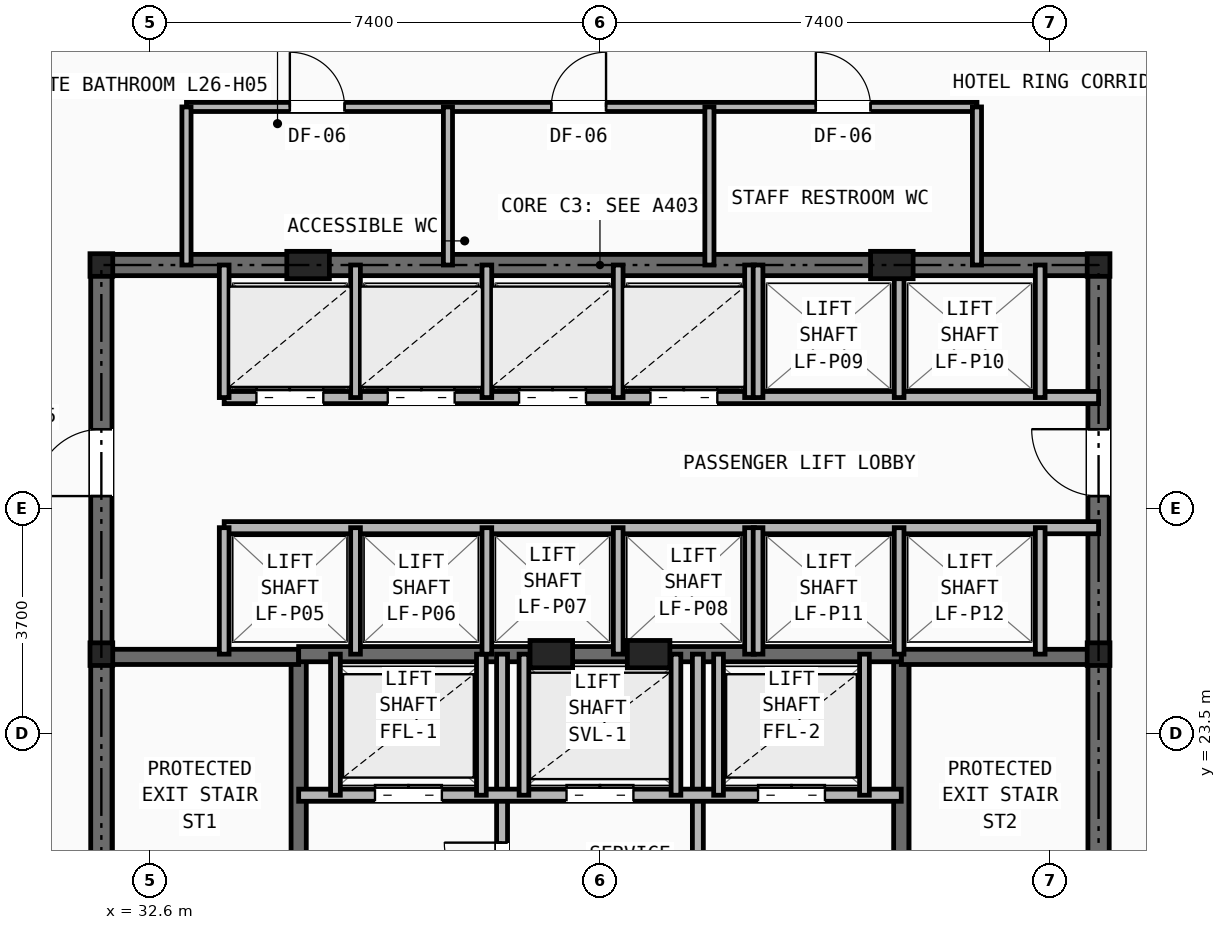
"""IFC4 building model, lengths in metres.
Left out: names, types, materials, properties, quantities, classifications, styles, units other than length and angle.
Written with IfcOpenShell. Run it as: python <this file> out.ifc"""

import sys

from ifc_helpers import new_model, si_unit, direction, frame, frame_2d, origin, origin_2d, place, context, subcontext, project, spatial, rectangle, i_section, extrude, element, fill, save


model = new_model("IFC4")
c1 = context("Model", 3, precision=1e-05, world=origin(), true_north=direction((0.0, 1.0)))
c2 = subcontext(c1, "Body", "Model", "MODEL_VIEW")
j1 = project(units=[si_unit("LENGTHUNIT", "METRE"), si_unit("PLANEANGLEUNIT", "RADIAN")], contexts=[c1])
p1 = place(None, origin())
s1 = spatial("IfcSite", under=j1, at=p1, CompositionType="ELEMENT")
p2 = place(p1, origin())
s2 = spatial("IfcBuilding", under=s1, at=p2, CompositionType="ELEMENT")
p3 = place(p2, frame((0.0, 0.0, 92.6)))
s3 = spatial("IfcBuildingStorey", under=s2, at=p3, CompositionType="ELEMENT", Elevation=92.6)
for number, where, z_axis, x_axis in (
    (1, (31.8, 24.8, 0.0), (0.0, 0.0, 1.0), (1.0, 0.0, 0.0)),
    (2, (48.2, 24.8, 0.0), (0.0, 0.0, 1.0), (1.0, 0.0, 0.0)),
    (3, (31.8, 31.2, 0.0), (0.0, 0.0, 1.0), (1.0, 0.0, 0.0)),
    (4, (48.2, 31.2, 0.0), (0.0, 0.0, 1.0), (1.0, 0.0, 0.0)),
):
    element("IfcColumn", number, at=place(p3, frame(where, z_axis=z_axis, x_axis=x_axis)), inside=s3, PredefinedType="COLUMN", context=c2, shape_type="SweptSolid", body=[
        extrude(i_section(OverallWidth=0.374, OverallDepth=0.372, WebThickness=0.016, FlangeThickness=0.026, at=origin_2d()), origin(), (0.0, 0.0, 1.0), 3.2),
    ])
for number, where, z_axis, x_axis in (
    (5, (35.2, 31.2, 0.0), (0.0, 0.0, 1.0), (1.0, 0.0, 0.0)),
    (6, (44.8, 31.2, 0.0), (0.0, 0.0, 1.0), (1.0, 0.0, 0.0)),
    (7, (39.2, 24.8, 0.0), (0.0, 0.0, 1.0), (1.0, 0.0, 0.0)),
    (8, (40.8, 24.8, 0.0), (0.0, 0.0, 1.0), (1.0, 0.0, 0.0)),
):
    element("IfcColumn", number, at=place(p3, frame(where, z_axis=z_axis, x_axis=x_axis)), inside=s3, PredefinedType="PILASTER", context=c2, shape_type="SweptSolid", body=[
        extrude(rectangle(XDim=0.7, YDim=0.45, at=origin_2d()), origin(), (0.0, 0.0, 1.0), 3.2),
    ])
p4 = place(p3, frame((31.8, 31.2, 0.0), z_axis=(0.0, 0.0, 1.0), x_axis=(1.0, 0.0, 0.0)))
e9 = element("IfcWall", 9, at=p4, inside=s3, PredefinedType="SHEAR", context=c2, shape_type="SweptSolid", body=[
    extrude(rectangle(XDim=16.4, YDim=0.35, at=frame_2d((8.2, 0.0))), origin(), (0.0, 0.0, 1.0), 2.97),
])
p5 = place(p3, frame((31.8, 16.4, 0.0), z_axis=(0.0, 0.0, 1.0), x_axis=(0.0, 1.0, 0.0)))
e10 = element("IfcWall", 10, at=p5, inside=s3, PredefinedType="SHEAR", context=c2, shape_type="SweptSolid", body=[
    extrude(rectangle(XDim=14.8, YDim=0.35, at=frame_2d((7.4, 0.0))), origin(), (0.0, 0.0, 1.0), 2.97),
])
p6 = place(p5, frame((11.0, 0.0, 0.0)))
e11 = element("IfcOpeningElement", 11, at=p6, cuts=e10, PredefinedType="OPENING", context=c2, shape_type="SweptSolid", body=[
    extrude(rectangle(XDim=1.1, YDim=2.15, at=frame_2d((0.55, 1.075))), frame((0.0, 0.185, 0.0), z_axis=(0.0, -1.0, 0.0), x_axis=(1.0, 0.0, 0.0)), (0.0, 0.0, 1.0), 0.37),
])
p7 = place(p3, frame((48.2, 16.4, 0.0), z_axis=(0.0, 0.0, 1.0), x_axis=(0.0, 1.0, 0.0)))
e12 = element("IfcWall", 12, at=p7, inside=s3, PredefinedType="SHEAR", context=c2, shape_type="SweptSolid", body=[
    extrude(rectangle(XDim=14.8, YDim=0.35, at=frame_2d((7.4, 0.0))), origin(), (0.0, 0.0, 1.0), 2.97),
])
p8 = place(p7, frame((11.0, 0.0, 0.0)))
e13 = element("IfcOpeningElement", 13, at=p8, cuts=e12, PredefinedType="OPENING", context=c2, shape_type="SweptSolid", body=[
    extrude(rectangle(XDim=1.1, YDim=2.15, at=frame_2d((0.55, 1.075))), frame((0.0, 0.185, 0.0), z_axis=(0.0, -1.0, 0.0), x_axis=(1.0, 0.0, 0.0)), (0.0, 0.0, 1.0), 0.37),
])
p9 = place(p3, frame((35.045, 16.4, 0.0), z_axis=(0.0, 0.0, 1.0), x_axis=(0.0, 1.0, 0.0)))
e14 = element("IfcWall", 14, at=p9, inside=s3, PredefinedType="SHEAR", context=c2, shape_type="SweptSolid", body=[
    extrude(rectangle(XDim=8.4, YDim=0.25, at=frame_2d((4.2, 0.0))), origin(), (0.0, 0.0, 1.0), 2.97),
])
p10 = place(p9, frame((0.45, 0.0, 0.0)))
e15 = element("IfcOpeningElement", 15, at=p10, cuts=e14, PredefinedType="OPENING", context=c2, shape_type="SweptSolid", body=[
    extrude(rectangle(XDim=0.95, YDim=2.1, at=frame_2d((0.475, 1.05))), frame((0.0, 0.135, 0.0), z_axis=(0.0, -1.0, 0.0), x_axis=(1.0, 0.0, 0.0)), (0.0, 0.0, 1.0), 0.27),
])
p11 = place(p3, frame((31.8, 24.755, 0.0), z_axis=(0.0, 0.0, 1.0), x_axis=(1.0, 0.0, 0.0)))
e16 = element("IfcWall", 16, at=p11, inside=s3, PredefinedType="SHEAR", context=c2, shape_type="SweptSolid", body=[
    extrude(rectangle(XDim=3.245, YDim=0.25, at=frame_2d((1.623, 0.0))), origin(), (0.0, 0.0, 1.0), 2.97),
])
p12 = place(p3, frame((44.955, 16.4, 0.0), z_axis=(0.0, 0.0, 1.0), x_axis=(0.0, 1.0, 0.0)))
e17 = element("IfcWall", 17, at=p12, inside=s3, PredefinedType="SHEAR", context=c2, shape_type="SweptSolid", body=[
    extrude(rectangle(XDim=8.4, YDim=0.25, at=frame_2d((4.2, 0.0))), origin(), (0.0, 0.0, 1.0), 2.97),
])
p13 = place(p12, frame((0.45, 0.0, 0.0)))
e18 = element("IfcOpeningElement", 18, at=p13, cuts=e17, PredefinedType="OPENING", context=c2, shape_type="SweptSolid", body=[
    extrude(rectangle(XDim=0.95, YDim=2.1, at=frame_2d((0.475, 1.05))), frame((0.0, 0.135, 0.0), z_axis=(0.0, -1.0, 0.0), x_axis=(1.0, 0.0, 0.0)), (0.0, 0.0, 1.0), 0.27),
])
p14 = place(p3, frame((44.955, 24.755, 0.0), z_axis=(0.0, 0.0, 1.0), x_axis=(1.0, 0.0, 0.0)))
e19 = element("IfcWall", 19, at=p14, inside=s3, PredefinedType="SHEAR", context=c2, shape_type="SweptSolid", body=[
    extrude(rectangle(XDim=3.245, YDim=0.25, at=frame_2d((1.623, 0.0))), origin(), (0.0, 0.0, 1.0), 2.97),
])
p15 = place(p3, frame((35.045, 24.8, 0.0), z_axis=(0.0, 0.0, 1.0), x_axis=(1.0, 0.0, 0.0)))
e20 = element("IfcWall", 20, at=p15, inside=s3, PredefinedType="SHEAR", context=c2, shape_type="SweptSolid", body=[
    extrude(rectangle(XDim=9.91, YDim=0.25, at=frame_2d((4.955, 0.0))), origin(), (0.0, 0.0, 1.0), 2.97),
])
p16 = place(p3, frame((38.39, 16.4, 0.0), z_axis=(0.0, 0.0, 1.0), x_axis=(0.0, 1.0, 0.0)))
e21 = element("IfcWall", 21, at=p16, inside=s3, PredefinedType="PARTITIONING", context=c2, shape_type="SweptSolid", body=[
    extrude(rectangle(XDim=8.4, YDim=0.18, at=frame_2d((4.2, 0.0))), origin(), (0.0, 0.0, 1.0), 2.421),
])
p17 = place(p16, frame((1.8, 0.0, 0.0)))
e22 = element("IfcOpeningElement", 22, at=p17, cuts=e21, PredefinedType="OPENING", context=c2, shape_type="SweptSolid", body=[
    extrude(rectangle(XDim=0.85, YDim=2.05, at=frame_2d((0.425, 1.025))), frame((0.0, 0.1, 0.0), z_axis=(0.0, -1.0, 0.0), x_axis=(1.0, 0.0, 0.0)), (0.0, 0.0, 1.0), 0.2),
])
p18 = place(p16, frame((4.35, 0.0, 0.0)))
e23 = element("IfcOpeningElement", 23, at=p18, cuts=e21, PredefinedType="OPENING", context=c2, shape_type="SweptSolid", body=[
    extrude(rectangle(XDim=0.95, YDim=2.1, at=frame_2d((0.475, 1.05))), frame((0.0, 0.1, 0.0), z_axis=(0.0, -1.0, 0.0), x_axis=(1.0, 0.0, 0.0)), (0.0, 0.0, 1.0), 0.2),
])
p19 = place(p3, frame((41.61, 16.4, 0.0), z_axis=(0.0, 0.0, 1.0), x_axis=(0.0, 1.0, 0.0)))
e24 = element("IfcWall", 24, at=p19, inside=s3, PredefinedType="PARTITIONING", context=c2, shape_type="SweptSolid", body=[
    extrude(rectangle(XDim=8.4, YDim=0.18, at=frame_2d((4.2, 0.0))), origin(), (0.0, 0.0, 1.0), 2.421),
])
p20 = place(p19, frame((1.8, 0.0, 0.0)))
e25 = element("IfcOpeningElement", 25, at=p20, cuts=e24, PredefinedType="OPENING", context=c2, shape_type="SweptSolid", body=[
    extrude(rectangle(XDim=0.85, YDim=2.05, at=frame_2d((0.425, 1.025))), frame((0.0, 0.1, 0.0), z_axis=(0.0, -1.0, 0.0), x_axis=(1.0, 0.0, 0.0)), (0.0, 0.0, 1.0), 0.2),
])
p21 = place(p3, frame((35.045, 22.48, 0.0), z_axis=(0.0, 0.0, 1.0), x_axis=(1.0, 0.0, 0.0)))
e26 = element("IfcWall", 26, at=p21, inside=s3, PredefinedType="SOLIDWALL", context=c2, shape_type="SweptSolid", body=[
    extrude(rectangle(XDim=9.91, YDim=0.2, at=frame_2d((4.955, 0.0))), origin(), (0.0, 0.0, 1.0), 2.97),
])
p22 = place(p21, frame((1.255, 0.0, 0.0)))
e27 = element("IfcOpeningElement", 27, at=p22, cuts=e26, PredefinedType="OPENING", context=c2, shape_type="SweptSolid", body=[
    extrude(rectangle(XDim=1.1, YDim=2.15, at=frame_2d((0.55, 1.075))), frame((0.0, 0.11, 0.0), z_axis=(0.0, -1.0, 0.0), x_axis=(1.0, 0.0, 0.0)), (0.0, 0.0, 1.0), 0.22),
])
p23 = place(p21, frame((7.555, 0.0, 0.0)))
e28 = element("IfcOpeningElement", 28, at=p23, cuts=e26, PredefinedType="OPENING", context=c2, shape_type="SweptSolid", body=[
    extrude(rectangle(XDim=1.1, YDim=2.15, at=frame_2d((0.55, 1.075))), frame((0.0, 0.11, 0.0), z_axis=(0.0, -1.0, 0.0), x_axis=(1.0, 0.0, 0.0)), (0.0, 0.0, 1.0), 0.22),
])
p24 = place(p21, frame((4.405, 0.0, 0.0)))
e29 = element("IfcOpeningElement", 29, at=p24, cuts=e26, PredefinedType="OPENING", context=c2, shape_type="SweptSolid", body=[
    extrude(rectangle(XDim=1.1, YDim=2.15, at=frame_2d((0.55, 1.075))), frame((0.0, 0.11, 0.0), z_axis=(0.0, -1.0, 0.0), x_axis=(1.0, 0.0, 0.0)), (0.0, 0.0, 1.0), 0.22),
])
for number, where, z_axis, x_axis in (
    (30, (35.65, 22.48, 0.0), (0.0, 0.0, 1.0), (0.0, 1.0, 0.0)),
    (31, (38.05, 22.48, 0.0), (0.0, 0.0, 1.0), (0.0, 1.0, 0.0)),
    (32, (41.95, 22.48, 0.0), (0.0, 0.0, 1.0), (0.0, 1.0, 0.0)),
    (33, (44.35, 22.48, 0.0), (0.0, 0.0, 1.0), (0.0, 1.0, 0.0)),
    (34, (38.75, 22.48, 0.0), (0.0, 0.0, 1.0), (0.0, 1.0, 0.0)),
    (35, (41.25, 22.48, 0.0), (0.0, 0.0, 1.0), (0.0, 1.0, 0.0)),
):
    element("IfcWall", number, at=place(p3, frame(where, z_axis=z_axis, x_axis=x_axis)), inside=s3, PredefinedType="SOLIDWALL", context=c2, shape_type="SweptSolid", body=[
        extrude(rectangle(XDim=2.32, YDim=0.16, at=frame_2d((1.16, 0.0))), origin(), (0.0, 0.0, 1.0), 2.97),
    ])
p25 = place(p3, frame((33.82, 29.02, 0.0), z_axis=(0.0, 0.0, 1.0), x_axis=(1.0, 0.0, 0.0)))
e36 = element("IfcWall", 36, at=p25, inside=s3, PredefinedType="SOLIDWALL", context=c2, shape_type="SweptSolid", body=[
    extrude(rectangle(XDim=14.38, YDim=0.2, at=frame_2d((7.19, 0.0))), origin(), (0.0, 0.0, 1.0), 2.421),
])
p26 = place(p25, frame((0.53, 0.0, 0.0)))
e37 = element("IfcOpeningElement", 37, at=p26, cuts=e36, PredefinedType="OPENING", context=c2, shape_type="SweptSolid", body=[
    extrude(rectangle(XDim=1.1, YDim=2.15, at=frame_2d((0.55, 1.075))), frame((0.0, 0.11, 0.0), z_axis=(0.0, -1.0, 0.0), x_axis=(1.0, 0.0, 0.0)), (0.0, 0.0, 1.0), 0.22),
])
p27 = place(p25, frame((2.69, 0.0, 0.0)))
e38 = element("IfcOpeningElement", 38, at=p27, cuts=e36, PredefinedType="OPENING", context=c2, shape_type="SweptSolid", body=[
    extrude(rectangle(XDim=1.1, YDim=2.15, at=frame_2d((0.55, 1.075))), frame((0.0, 0.11, 0.0), z_axis=(0.0, -1.0, 0.0), x_axis=(1.0, 0.0, 0.0)), (0.0, 0.0, 1.0), 0.22),
])
p28 = place(p25, frame((4.85, 0.0, 0.0)))
e39 = element("IfcOpeningElement", 39, at=p28, cuts=e36, PredefinedType="OPENING", context=c2, shape_type="SweptSolid", body=[
    extrude(rectangle(XDim=1.1, YDim=2.15, at=frame_2d((0.55, 1.075))), frame((0.0, 0.11, 0.0), z_axis=(0.0, -1.0, 0.0), x_axis=(1.0, 0.0, 0.0)), (0.0, 0.0, 1.0), 0.22),
])
p29 = place(p25, frame((7.01, 0.0, 0.0)))
e40 = element("IfcOpeningElement", 40, at=p29, cuts=e36, PredefinedType="OPENING", context=c2, shape_type="SweptSolid", body=[
    extrude(rectangle(XDim=1.1, YDim=2.15, at=frame_2d((0.55, 1.075))), frame((0.0, 0.11, 0.0), z_axis=(0.0, -1.0, 0.0), x_axis=(1.0, 0.0, 0.0)), (0.0, 0.0, 1.0), 0.22),
])
p30 = place(p3, frame((33.82, 26.88, 0.0), z_axis=(0.0, 0.0, 1.0), x_axis=(1.0, 0.0, 0.0)))
e41 = element("IfcWall", 41, at=p30, inside=s3, PredefinedType="SOLIDWALL", context=c2, shape_type="SweptSolid", body=[
    extrude(rectangle(XDim=14.38, YDim=0.2, at=frame_2d((7.19, 0.0))), origin(), (0.0, 0.0, 1.0), 2.421),
])
p31 = place(p3, frame((33.82, 29.02, 0.0), z_axis=(0.0, 0.0, 1.0), x_axis=(0.0, 1.0, 0.0)))
e42 = element("IfcWall", 42, at=p31, inside=s3, PredefinedType="SOLIDWALL", context=c2, shape_type="SweptSolid", body=[
    extrude(rectangle(XDim=2.18, YDim=0.16, at=frame_2d((1.09, 0.0))), origin(), (0.0, 0.0, 1.0), 2.421),
])
p32 = place(p3, frame((33.82, 24.8, 0.0), z_axis=(0.0, 0.0, 1.0), x_axis=(0.0, 1.0, 0.0)))
e43 = element("IfcWall", 43, at=p32, inside=s3, PredefinedType="SOLIDWALL", context=c2, shape_type="SweptSolid", body=[
    extrude(rectangle(XDim=2.08, YDim=0.16, at=frame_2d((1.04, 0.0))), origin(), (0.0, 0.0, 1.0), 2.97),
])
for number, where, z_axis, x_axis in (
    (44, (35.98, 29.02, 0.0), (0.0, 0.0, 1.0), (0.0, 1.0, 0.0)),
    (45, (38.14, 29.02, 0.0), (0.0, 0.0, 1.0), (0.0, 1.0, 0.0)),
    (46, (40.3, 29.02, 0.0), (0.0, 0.0, 1.0), (0.0, 1.0, 0.0)),
    (47, (42.46, 29.02, 0.0), (0.0, 0.0, 1.0), (0.0, 1.0, 0.0)),
):
    element("IfcWall", number, at=place(p3, frame(where, z_axis=z_axis, x_axis=x_axis)), inside=s3, PredefinedType="SOLIDWALL", context=c2, shape_type="SweptSolid", body=[
        extrude(rectangle(XDim=2.18, YDim=0.16, at=frame_2d((1.09, 0.0))), origin(), (0.0, 0.0, 1.0), 2.421),
    ])
for number, where, z_axis, x_axis in (
    (48, (35.98, 24.8, 0.0), (0.0, 0.0, 1.0), (0.0, 1.0, 0.0)),
    (49, (38.14, 24.8, 0.0), (0.0, 0.0, 1.0), (0.0, 1.0, 0.0)),
    (50, (40.3, 24.8, 0.0), (0.0, 0.0, 1.0), (0.0, 1.0, 0.0)),
    (51, (42.46, 24.8, 0.0), (0.0, 0.0, 1.0), (0.0, 1.0, 0.0)),
):
    element("IfcWall", number, at=place(p3, frame(where, z_axis=z_axis, x_axis=x_axis)), inside=s3, PredefinedType="SOLIDWALL", context=c2, shape_type="SweptSolid", body=[
        extrude(rectangle(XDim=2.08, YDim=0.16, at=frame_2d((1.04, 0.0))), origin(), (0.0, 0.0, 1.0), 2.97),
    ])
for number, where, z_axis, x_axis in (
    (52, (42.6, 29.02, 0.0), (0.0, 0.0, 1.0), (0.0, 1.0, 0.0)),
    (53, (44.92, 29.02, 0.0), (0.0, 0.0, 1.0), (0.0, 1.0, 0.0)),
    (54, (47.24, 29.02, 0.0), (0.0, 0.0, 1.0), (0.0, 1.0, 0.0)),
):
    element("IfcWall", number, at=place(p3, frame(where, z_axis=z_axis, x_axis=x_axis)), inside=s3, PredefinedType="SOLIDWALL", context=c2, shape_type="SweptSolid", body=[
        extrude(rectangle(XDim=2.18, YDim=0.16, at=frame_2d((1.09, 0.0))), origin(), (0.0, 0.0, 1.0), 2.421),
    ])
for number, where, z_axis, x_axis in (
    (55, (42.6, 24.8, 0.0), (0.0, 0.0, 1.0), (0.0, 1.0, 0.0)),
    (56, (44.92, 24.8, 0.0), (0.0, 0.0, 1.0), (0.0, 1.0, 0.0)),
    (57, (47.24, 24.8, 0.0), (0.0, 0.0, 1.0), (0.0, 1.0, 0.0)),
):
    element("IfcWall", number, at=place(p3, frame(where, z_axis=z_axis, x_axis=x_axis)), inside=s3, PredefinedType="SOLIDWALL", context=c2, shape_type="SweptSolid", body=[
        extrude(rectangle(XDim=2.08, YDim=0.16, at=frame_2d((1.04, 0.0))), origin(), (0.0, 0.0, 1.0), 2.97),
    ])
p33 = place(p3, frame((33.2, 33.8, 0.0), z_axis=(0.0, 0.0, 1.0), x_axis=(1.0, 0.0, 0.0)))
e58 = element("IfcWall", 58, at=p33, inside=s3, PredefinedType="PARTITIONING", context=c2, shape_type="SweptSolid", body=[
    extrude(rectangle(XDim=13.0, YDim=0.15, at=frame_2d((6.5, 0.0))), origin(), (0.0, 0.0, 1.0), 2.97),
])
p34 = place(p33, frame((1.7, 0.0, 0.0)))
e59 = element("IfcOpeningElement", 59, at=p34, cuts=e58, PredefinedType="OPENING", context=c2, shape_type="SweptSolid", body=[
    extrude(rectangle(XDim=0.9, YDim=2.1, at=frame_2d((0.45, 1.05))), frame((0.0, 0.085, 0.0), z_axis=(0.0, -1.0, 0.0), x_axis=(1.0, 0.0, 0.0)), (0.0, 0.0, 1.0), 0.17),
])
p35 = place(p33, frame((6.0, 0.0, 0.0)))
e60 = element("IfcOpeningElement", 60, at=p35, cuts=e58, PredefinedType="OPENING", context=c2, shape_type="SweptSolid", body=[
    extrude(rectangle(XDim=0.9, YDim=2.1, at=frame_2d((0.45, 1.05))), frame((0.0, 0.085, 0.0), z_axis=(0.0, -1.0, 0.0), x_axis=(1.0, 0.0, 0.0)), (0.0, 0.0, 1.0), 0.17),
])
p36 = place(p33, frame((10.35, 0.0, 0.0)))
e61 = element("IfcOpeningElement", 61, at=p36, cuts=e58, PredefinedType="OPENING", context=c2, shape_type="SweptSolid", body=[
    extrude(rectangle(XDim=0.9, YDim=2.1, at=frame_2d((0.45, 1.05))), frame((0.0, 0.085, 0.0), z_axis=(0.0, -1.0, 0.0), x_axis=(1.0, 0.0, 0.0)), (0.0, 0.0, 1.0), 0.17),
])
for number, where, z_axis, x_axis in (
    (62, (33.2, 31.2, 0.0), (0.0, 0.0, 1.0), (0.0, 1.0, 0.0)),
    (63, (46.2, 31.2, 0.0), (0.0, 0.0, 1.0), (0.0, 1.0, 0.0)),
    (64, (37.5, 31.2, 0.0), (0.0, 0.0, 1.0), (0.0, 1.0, 0.0)),
    (65, (41.8, 31.2, 0.0), (0.0, 0.0, 1.0), (0.0, 1.0, 0.0)),
):
    element("IfcWall", number, at=place(p3, frame(where, z_axis=z_axis, x_axis=x_axis)), inside=s3, PredefinedType="PARTITIONING", context=c2, shape_type="SweptSolid", body=[
        extrude(rectangle(XDim=2.6, YDim=0.15, at=frame_2d((1.3, 0.0))), origin(), (0.0, 0.0, 1.0), 2.421),
    ])
p37 = place(p18, origin())
e66 = element("IfcDoor", 66, at=p37, inside=s3, OperationType="SINGLE_SWING_RIGHT", PredefinedType="DOOR", context=c2, shape_type="SweptSolid", body=[
    extrude(rectangle(XDim=0.95, YDim=2.1, at=frame_2d((0.475, 1.05))), frame((0.0, 0.025, 0.0), z_axis=(0.0, -1.0, 0.0), x_axis=(1.0, 0.0, 0.0)), (0.0, 0.0, 1.0), 0.05),
])
fill(e23, e66)
p38 = place(p22, origin())
e67 = element("IfcDoor", 67, at=p38, inside=s3, OperationType="DOUBLE_DOOR_SLIDING", PredefinedType="DOOR", context=c2, shape_type="SweptSolid", body=[
    extrude(rectangle(XDim=1.1, YDim=2.15, at=frame_2d((0.55, 1.075))), frame((0.0, 0.025, 0.0), z_axis=(0.0, -1.0, 0.0), x_axis=(1.0, 0.0, 0.0)), (0.0, 0.0, 1.0), 0.05),
])
fill(e27, e67)
p39 = place(p23, origin())
e68 = element("IfcDoor", 68, at=p39, inside=s3, OperationType="DOUBLE_DOOR_SLIDING", PredefinedType="DOOR", context=c2, shape_type="SweptSolid", body=[
    extrude(rectangle(XDim=1.1, YDim=2.15, at=frame_2d((0.55, 1.075))), frame((0.0, 0.025, 0.0), z_axis=(0.0, -1.0, 0.0), x_axis=(1.0, 0.0, 0.0)), (0.0, 0.0, 1.0), 0.05),
])
fill(e28, e68)
p40 = place(p24, origin())
e69 = element("IfcDoor", 69, at=p40, inside=s3, OperationType="DOUBLE_DOOR_SLIDING", PredefinedType="DOOR", context=c2, shape_type="SweptSolid", body=[
    extrude(rectangle(XDim=1.1, YDim=2.15, at=frame_2d((0.55, 1.075))), frame((0.0, 0.025, 0.0), z_axis=(0.0, -1.0, 0.0), x_axis=(1.0, 0.0, 0.0)), (0.0, 0.0, 1.0), 0.05),
])
fill(e29, e69)
p41 = place(p6, origin())
e70 = element("IfcDoor", 70, at=p41, inside=s3, OperationType="SINGLE_SWING_LEFT", PredefinedType="DOOR", context=c2, shape_type="SweptSolid", body=[
    extrude(rectangle(XDim=1.1, YDim=2.15, at=frame_2d((0.55, 1.075))), frame((0.0, 0.025, 0.0), z_axis=(0.0, -1.0, 0.0), x_axis=(1.0, 0.0, 0.0)), (0.0, 0.0, 1.0), 0.05),
])
fill(e11, e70)
p42 = place(p8, origin())
e71 = element("IfcDoor", 71, at=p42, inside=s3, OperationType="SINGLE_SWING_RIGHT", PredefinedType="DOOR", context=c2, shape_type="SweptSolid", body=[
    extrude(rectangle(XDim=1.1, YDim=2.15, at=frame_2d((0.55, 1.075))), frame((0.0, 0.025, 0.0), z_axis=(0.0, -1.0, 0.0), x_axis=(1.0, 0.0, 0.0)), (0.0, 0.0, 1.0), 0.05),
])
fill(e13, e71)
p43 = place(p26, origin())
e72 = element("IfcDoor", 72, at=p43, inside=s3, OperationType="DOUBLE_DOOR_SLIDING", PredefinedType="DOOR", context=c2, shape_type="SweptSolid", body=[
    extrude(rectangle(XDim=1.1, YDim=2.15, at=frame_2d((0.55, 1.075))), frame((0.0, 0.025, 0.0), z_axis=(0.0, -1.0, 0.0), x_axis=(1.0, 0.0, 0.0)), (0.0, 0.0, 1.0), 0.05),
])
fill(e37, e72)
p44 = place(p27, origin())
e73 = element("IfcDoor", 73, at=p44, inside=s3, OperationType="DOUBLE_DOOR_SLIDING", PredefinedType="DOOR", context=c2, shape_type="SweptSolid", body=[
    extrude(rectangle(XDim=1.1, YDim=2.15, at=frame_2d((0.55, 1.075))), frame((0.0, 0.025, 0.0), z_axis=(0.0, -1.0, 0.0), x_axis=(1.0, 0.0, 0.0)), (0.0, 0.0, 1.0), 0.05),
])
fill(e38, e73)
p45 = place(p28, origin())
e74 = element("IfcDoor", 74, at=p45, inside=s3, OperationType="DOUBLE_DOOR_SLIDING", PredefinedType="DOOR", context=c2, shape_type="SweptSolid", body=[
    extrude(rectangle(XDim=1.1, YDim=2.15, at=frame_2d((0.55, 1.075))), frame((0.0, 0.025, 0.0), z_axis=(0.0, -1.0, 0.0), x_axis=(1.0, 0.0, 0.0)), (0.0, 0.0, 1.0), 0.05),
])
fill(e39, e74)
p46 = place(p29, origin())
e75 = element("IfcDoor", 75, at=p46, inside=s3, OperationType="DOUBLE_DOOR_SLIDING", PredefinedType="DOOR", context=c2, shape_type="SweptSolid", body=[
    extrude(rectangle(XDim=1.1, YDim=2.15, at=frame_2d((0.55, 1.075))), frame((0.0, 0.025, 0.0), z_axis=(0.0, -1.0, 0.0), x_axis=(1.0, 0.0, 0.0)), (0.0, 0.0, 1.0), 0.05),
])
fill(e40, e75)
p47 = place(p34, origin())
e76 = element("IfcDoor", 76, at=p47, inside=s3, OperationType="SINGLE_SWING_LEFT", PredefinedType="DOOR", context=c2, shape_type="SweptSolid", body=[
    extrude(rectangle(XDim=0.9, YDim=2.1, at=frame_2d((0.45, 1.05))), frame((0.0, 0.025, 0.0), z_axis=(0.0, -1.0, 0.0), x_axis=(1.0, 0.0, 0.0)), (0.0, 0.0, 1.0), 0.05),
])
fill(e59, e76)
p48 = place(p35, origin())
e77 = element("IfcDoor", 77, at=p48, inside=s3, OperationType="SINGLE_SWING_RIGHT", PredefinedType="DOOR", context=c2, shape_type="SweptSolid", body=[
    extrude(rectangle(XDim=0.9, YDim=2.1, at=frame_2d((0.45, 1.05))), frame((0.0, 0.025, 0.0), z_axis=(0.0, -1.0, 0.0), x_axis=(1.0, 0.0, 0.0)), (0.0, 0.0, 1.0), 0.05),
])
fill(e60, e77)
p49 = place(p36, origin())
e78 = element("IfcDoor", 78, at=p49, inside=s3, OperationType="SINGLE_SWING_LEFT", PredefinedType="DOOR", context=c2, shape_type="SweptSolid", body=[
    extrude(rectangle(XDim=0.9, YDim=2.1, at=frame_2d((0.45, 1.05))), frame((0.0, 0.025, 0.0), z_axis=(0.0, -1.0, 0.0), x_axis=(1.0, 0.0, 0.0)), (0.0, 0.0, 1.0), 0.05),
])
fill(e61, e78)
save(model, sys.argv[1])
